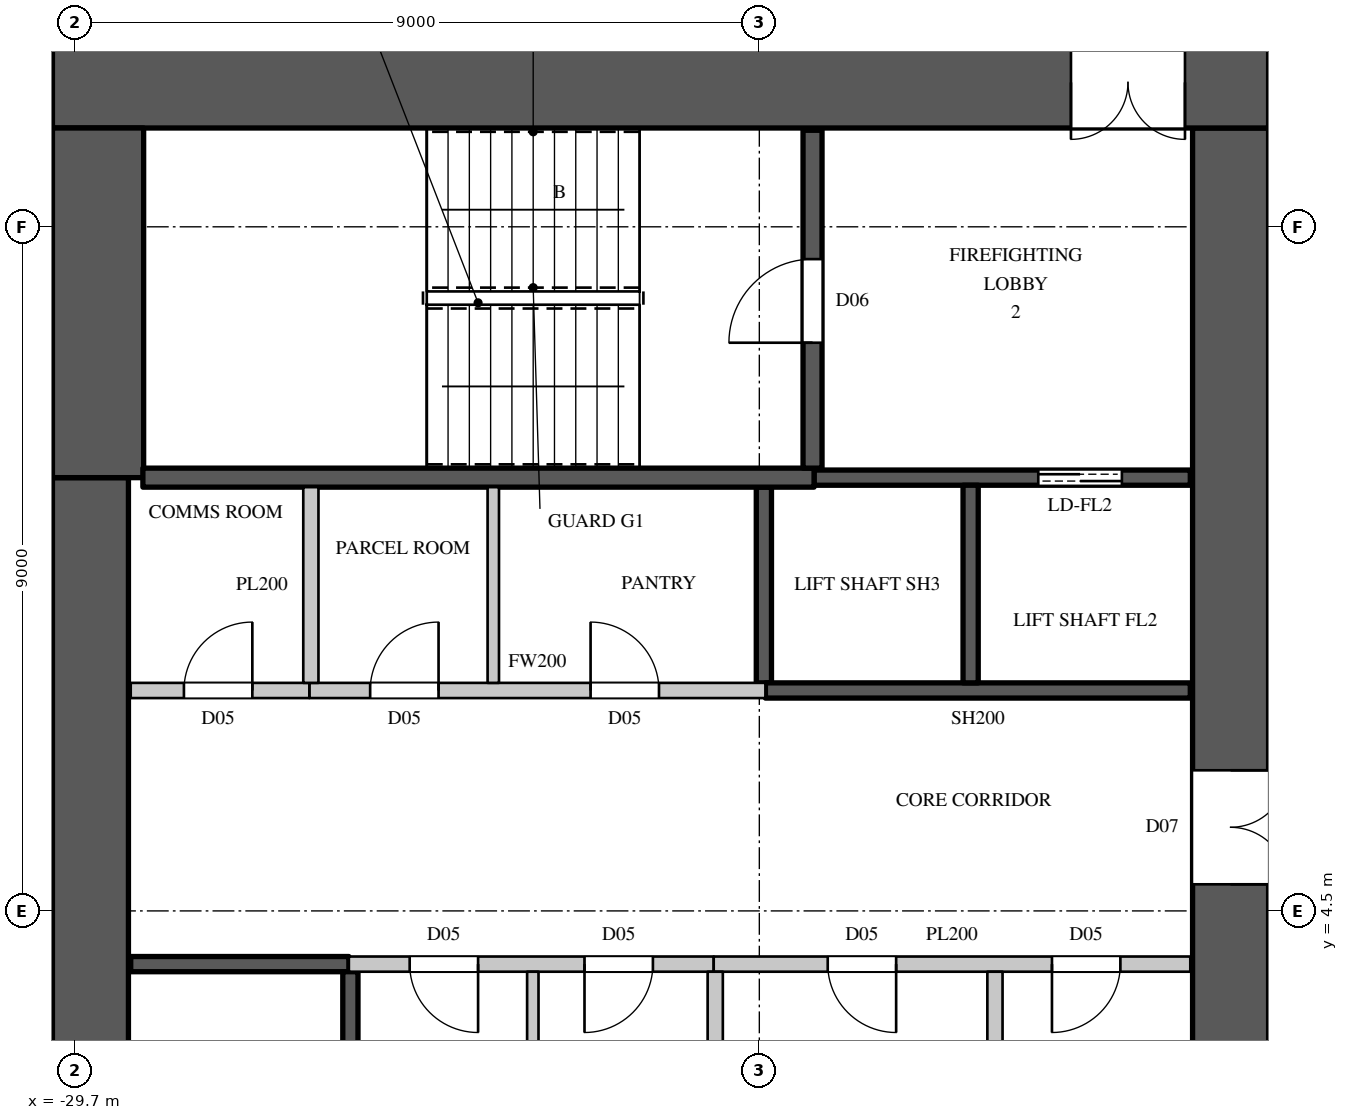
"""IFC4 building model, lengths in metres.
Left out: names, types, materials, properties, quantities, classifications, styles, units other than length and angle.
Written with IfcOpenShell. Run it as: python <this file> out.ifc"""

import sys

from ifc_helpers import new_model, si_unit, direction, frame, frame_2d, origin, place, context, subcontext, project, spatial, rectangle, extrude, element, fill, save


model = new_model("IFC4")
c1 = context("Model", 3, precision=1e-05, world=origin(), true_north=direction((0.0, 1.0)))
c2 = subcontext(c1, "Body", "Model", "MODEL_VIEW")
j1 = project(units=[si_unit("LENGTHUNIT", "METRE"), si_unit("PLANEANGLEUNIT", "RADIAN")], contexts=[c1])
p1 = place(None, origin())
s1 = spatial("IfcSite", under=j1, at=p1, CompositionType="ELEMENT")
p2 = place(p1, origin())
s2 = spatial("IfcBuilding", under=s1, at=p2, CompositionType="ELEMENT")
p3 = place(p2, frame((0.0, 0.0, 123.9)))
s3 = spatial("IfcBuildingStorey", under=s2, at=p3, CompositionType="ELEMENT", Elevation=123.9)
p4 = place(p3, frame((-30.0, 15.4, 0.0), z_axis=(0.0, 0.0, 1.0), x_axis=(1.0, 0.0, 0.0)))
e1 = element("IfcWall", 1, at=p4, inside=s3, PredefinedType="SHEAR", context=c2, shape_type="SweptSolid", body=[
    extrude(rectangle(XDim=16.0, YDim=1.2, at=frame_2d((8.0, 0.0))), origin(), (0.0, 0.0, 1.0), 3.6),
])
p5 = place(p4, frame((13.4, 0.0, 0.0)))
e2 = element("IfcOpeningElement", 2, at=p5, cuts=e1, PredefinedType="OPENING", context=c2, shape_type="SweptSolid", body=[
    extrude(rectangle(XDim=1.5, YDim=2.4, at=frame_2d((0.75, 1.2))), frame((0.0, 0.61, 0.0), z_axis=(0.0, -1.0, 0.0), x_axis=(1.0, 0.0, 0.0)), (0.0, 0.0, 1.0), 1.22),
])
p6 = place(p3, frame((-14.5, -14.8, 0.0), z_axis=(0.0, 0.0, 1.0), x_axis=(0.0, 1.0, 0.0)))
e3 = element("IfcWall", 3, at=p6, inside=s3, PredefinedType="SHEAR", context=c2, shape_type="SweptSolid", body=[
    extrude(rectangle(XDim=29.6, YDim=1.0, at=frame_2d((14.8, 0.0))), origin(), (0.0, 0.0, 1.0), 3.6),
])
p7 = place(p6, frame((8.45, 0.0, 0.0)))
e4 = element("IfcOpeningElement", 4, at=p7, cuts=e3, PredefinedType="OPENING", context=c2, shape_type="SweptSolid", body=[
    extrude(rectangle(XDim=1.5, YDim=2.4, at=frame_2d((0.75, 1.2))), frame((0.0, 0.51, 0.0), z_axis=(0.0, -1.0, 0.0), x_axis=(1.0, 0.0, 0.0)), (0.0, 0.0, 1.0), 1.02),
])
p8 = place(p6, frame((19.65, 0.0, 0.0)))
e5 = element("IfcOpeningElement", 5, at=p8, cuts=e3, PredefinedType="OPENING", context=c2, shape_type="SweptSolid", body=[
    extrude(rectangle(XDim=1.5, YDim=2.4, at=frame_2d((0.75, 1.2))), frame((0.0, 0.51, 0.0), z_axis=(0.0, -1.0, 0.0), x_axis=(1.0, 0.0, 0.0)), (0.0, 0.0, 1.0), 1.02),
])
p9 = place(p6, frame((14.5, 0.0, 0.0)))
e6 = element("IfcOpeningElement", 6, at=p9, cuts=e3, PredefinedType="OPENING", context=c2, shape_type="SweptSolid", body=[
    extrude(rectangle(XDim=0.6, YDim=2.0, at=frame_2d((0.3, 1.0))), frame((0.0, 0.51, 0.0), z_axis=(0.0, -1.0, 0.0), x_axis=(1.0, 0.0, 0.0)), (0.0, 0.0, 1.0), 1.02),
])
p10 = place(p3, frame((-29.5, -10.2, 0.0), z_axis=(0.0, 0.0, 1.0), x_axis=(0.0, 1.0, 0.0)))
e7 = element("IfcWall", 7, at=p10, inside=s3, PredefinedType="SHEAR", context=c2, shape_type="SweptSolid", body=[
    extrude(rectangle(XDim=20.4, YDim=1.0, at=frame_2d((10.2, 0.0))), origin(), (0.0, 0.0, 1.0), 3.6),
])
p11 = place(p3, frame((-29.4, 10.2, 0.0), z_axis=(0.0, 0.0, 1.0), x_axis=(0.0, 1.0, 0.0)))
e8 = element("IfcWall", 8, at=p11, inside=s3, PredefinedType="SHEAR", context=c2, shape_type="SweptSolid", body=[
    extrude(rectangle(XDim=4.6, YDim=1.2, at=frame_2d((2.3, 0.0))), origin(), (0.0, 0.0, 1.0), 3.6),
])
p12 = place(p3, frame((-26.62, 7.4, 0.0), z_axis=(0.0, 0.0, 1.0), x_axis=(1.0, 0.0, 0.0)))
e9 = element("IfcWall", 9, at=p12, inside=s3, PredefinedType="PARTITIONING", context=c2, shape_type="SweptSolid", body=[
    extrude(rectangle(XDim=6.0, YDim=0.2, at=frame_2d((3.0, 0.0))), origin(), (0.0, 0.0, 1.0), 3.3),
])
p13 = place(p12, frame((0.8, 0.0, 0.0)))
e10 = element("IfcOpeningElement", 10, at=p13, cuts=e9, PredefinedType="OPENING", context=c2, shape_type="SweptSolid", body=[
    extrude(rectangle(XDim=0.9, YDim=2.2, at=frame_2d((0.45, 1.1))), frame((0.0, 0.11, 0.0), z_axis=(0.0, -1.0, 0.0), x_axis=(1.0, 0.0, 0.0)), (0.0, 0.0, 1.0), 0.22),
])
p14 = place(p12, frame((3.7, 0.0, 0.0)))
e11 = element("IfcOpeningElement", 11, at=p14, cuts=e9, PredefinedType="OPENING", context=c2, shape_type="SweptSolid", body=[
    extrude(rectangle(XDim=0.9, YDim=2.2, at=frame_2d((0.45, 1.1))), frame((0.0, 0.11, 0.0), z_axis=(0.0, -1.0, 0.0), x_axis=(1.0, 0.0, 0.0)), (0.0, 0.0, 1.0), 0.22),
])
p15 = place(p3, frame((-26.1, 3.8, 0.0), z_axis=(0.0, 0.0, 1.0), x_axis=(1.0, 0.0, 0.0)))
e12 = element("IfcWall", 12, at=p15, inside=s3, PredefinedType="PARTITIONING", context=c2, shape_type="SweptSolid", body=[
    extrude(rectangle(XDim=4.8, YDim=0.2, at=frame_2d((2.4, 0.0))), origin(), (0.0, 0.0, 1.0), 3.3),
])
p16 = place(p15, frame((0.8, 0.0, 0.0)))
e13 = element("IfcOpeningElement", 13, at=p16, cuts=e12, PredefinedType="OPENING", context=c2, shape_type="SweptSolid", body=[
    extrude(rectangle(XDim=0.9, YDim=2.2, at=frame_2d((0.45, 1.1))), frame((0.0, 0.11, 0.0), z_axis=(0.0, -1.0, 0.0), x_axis=(1.0, 0.0, 0.0)), (0.0, 0.0, 1.0), 0.22),
])
p17 = place(p15, frame((3.1, 0.0, 0.0)))
e14 = element("IfcOpeningElement", 14, at=p17, cuts=e12, PredefinedType="OPENING", context=c2, shape_type="SweptSolid", body=[
    extrude(rectangle(XDim=0.9, YDim=2.2, at=frame_2d((0.45, 1.1))), frame((0.0, 0.11, 0.0), z_axis=(0.0, -1.0, 0.0), x_axis=(1.0, 0.0, 0.0)), (0.0, 0.0, 1.0), 0.22),
])
p18 = place(p3, frame((-24.2, 7.5, 0.0), z_axis=(0.0, 0.0, 1.0), x_axis=(0.0, 1.0, 0.0)))
e15 = element("IfcWall", 15, at=p18, inside=s3, PredefinedType="PARTITIONING", context=c2, shape_type="SweptSolid", body=[
    extrude(rectangle(XDim=2.575, YDim=0.15, at=frame_2d((1.288, 0.0))), origin(), (0.0, 0.0, 1.0), 3.3),
])
p19 = place(p3, frame((-23.68, 1.1, 0.0), z_axis=(0.0, 0.0, 1.0), x_axis=(0.0, 1.0, 0.0)))
e16 = element("IfcWall", 16, at=p19, inside=s3, PredefinedType="PARTITIONING", context=c2, shape_type="SweptSolid", body=[
    extrude(rectangle(XDim=2.6, YDim=0.15, at=frame_2d((1.3, 0.0))), origin(), (0.0, 0.0, 1.0), 3.3),
])
p20 = place(p3, frame((-28.97, 7.4, 0.0), z_axis=(0.0, 0.0, 1.0), x_axis=(1.0, 0.0, 0.0)))
e17 = element("IfcWall", 17, at=p20, inside=s3, PredefinedType="PARTITIONING", context=c2, shape_type="SweptSolid", body=[
    extrude(rectangle(XDim=2.35, YDim=0.2, at=frame_2d((1.175, 0.0))), origin(), (0.0, 0.0, 1.0), 3.3),
])
p21 = place(p20, frame((0.7, 0.0, 0.0)))
e18 = element("IfcOpeningElement", 18, at=p21, cuts=e17, PredefinedType="OPENING", context=c2, shape_type="SweptSolid", body=[
    extrude(rectangle(XDim=0.9, YDim=2.2, at=frame_2d((0.45, 1.1))), frame((0.0, 0.11, 0.0), z_axis=(0.0, -1.0, 0.0), x_axis=(1.0, 0.0, 0.0)), (0.0, 0.0, 1.0), 0.22),
])
p22 = place(p3, frame((-26.6, 7.5, 0.0), z_axis=(0.0, 0.0, 1.0), x_axis=(0.0, 1.0, 0.0)))
e19 = element("IfcWall", 19, at=p22, inside=s3, PredefinedType="PARTITIONING", context=c2, shape_type="SweptSolid", body=[
    extrude(rectangle(XDim=2.575, YDim=0.2, at=frame_2d((1.288, 0.0))), origin(), (0.0, 0.0, 1.0), 3.3),
])
p23 = place(p3, frame((-21.3, 3.8, 0.0), z_axis=(0.0, 0.0, 1.0), x_axis=(1.0, 0.0, 0.0)))
e20 = element("IfcWall", 20, at=p23, inside=s3, PredefinedType="PARTITIONING", context=c2, shape_type="SweptSolid", body=[
    extrude(rectangle(XDim=6.27, YDim=0.2, at=frame_2d((3.135, 0.0))), origin(), (0.0, 0.0, 1.0), 3.3),
])
p24 = place(p23, frame((1.5, 0.0, 0.0)))
e21 = element("IfcOpeningElement", 21, at=p24, cuts=e20, PredefinedType="OPENING", context=c2, shape_type="SweptSolid", body=[
    extrude(rectangle(XDim=0.9, YDim=2.2, at=frame_2d((0.45, 1.1))), frame((0.0, 0.11, 0.0), z_axis=(0.0, -1.0, 0.0), x_axis=(1.0, 0.0, 0.0)), (0.0, 0.0, 1.0), 0.22),
])
p25 = place(p23, frame((4.45, 0.0, 0.0)))
e22 = element("IfcOpeningElement", 22, at=p25, cuts=e20, PredefinedType="OPENING", context=c2, shape_type="SweptSolid", body=[
    extrude(rectangle(XDim=0.9, YDim=2.2, at=frame_2d((0.45, 1.1))), frame((0.0, 0.11, 0.0), z_axis=(0.0, -1.0, 0.0), x_axis=(1.0, 0.0, 0.0)), (0.0, 0.0, 1.0), 0.22),
])
for number, where, z_axis, x_axis in (
    (23, (-21.28, 1.1, 0.0), (0.0, 0.0, 1.0), (0.0, 1.0, 0.0)),
    (24, (-17.6, 1.1, 0.0), (0.0, 0.0, 1.0), (0.0, 1.0, 0.0)),
):
    element("IfcWall", number, at=place(p3, frame(where, z_axis=z_axis, x_axis=x_axis)), inside=s3, PredefinedType="PARTITIONING", context=c2, shape_type="SweptSolid", body=[
        extrude(rectangle(XDim=2.6, YDim=0.2, at=frame_2d((1.3, 0.0))), origin(), (0.0, 0.0, 1.0), 3.3),
    ])
p26 = place(p3, frame((-28.97, 3.8, 0.0), z_axis=(0.0, 0.0, 1.0), x_axis=(1.0, 0.0, 0.0)))
e25 = element("IfcWall", 25, at=p26, inside=s3, PredefinedType="SHEAR", context=c2, shape_type="SweptSolid", body=[
    extrude(rectangle(XDim=2.87, YDim=0.2, at=frame_2d((1.435, 0.0))), origin(), (0.0, 0.0, 1.0), 3.3),
])
p27 = place(p3, frame((-26.08, 1.1, 0.0), z_axis=(0.0, 0.0, 1.0), x_axis=(0.0, 1.0, 0.0)))
e26 = element("IfcWall", 26, at=p27, inside=s3, PredefinedType="SHEAR", context=c2, shape_type="SweptSolid", body=[
    extrude(rectangle(XDim=2.6, YDim=0.2, at=frame_2d((1.3, 0.0))), origin(), (0.0, 0.0, 1.0), 3.3),
])
p28 = place(p3, frame((-20.64, 7.5, 0.0), z_axis=(0.0, 0.0, 1.0), x_axis=(0.0, 1.0, 0.0)))
e27 = element("IfcWall", 27, at=p28, inside=s3, PredefinedType="SHEAR", context=c2, shape_type="SweptSolid", body=[
    extrude(rectangle(XDim=2.575, YDim=0.2, at=frame_2d((1.288, 0.0))), origin(), (0.0, 0.0, 1.0), 3.3),
])
p29 = place(p3, frame((-20.62, 7.4, 0.0), z_axis=(0.0, 0.0, 1.0), x_axis=(1.0, 0.0, 0.0)))
e28 = element("IfcWall", 28, at=p29, inside=s3, PredefinedType="SHEAR", context=c2, shape_type="SweptSolid", body=[
    extrude(rectangle(XDim=5.59, YDim=0.2, at=frame_2d((2.795, 0.0))), origin(), (0.0, 0.0, 1.0), 3.3),
])
p30 = place(p3, frame((-19.98, 10.2, 0.0), z_axis=(0.0, 0.0, 1.0), x_axis=(1.0, 0.0, 0.0)))
e29 = element("IfcWall", 29, at=p30, inside=s3, PredefinedType="SHEAR", context=c2, shape_type="SweptSolid", body=[
    extrude(rectangle(XDim=4.95, YDim=0.2, at=frame_2d((2.475, 0.0))), origin(), (0.0, 0.0, 1.0), 3.3),
])
p31 = place(p30, frame((2.95, 0.0, 0.0)))
e30 = element("IfcOpeningElement", 30, at=p31, cuts=e29, PredefinedType="OPENING", context=c2, shape_type="SweptSolid", body=[
    extrude(rectangle(XDim=1.1, YDim=2.2, at=frame_2d((0.55, 1.1))), frame((0.0, 0.11, 0.0), z_axis=(0.0, -1.0, 0.0), x_axis=(1.0, 0.0, 0.0)), (0.0, 0.0, 1.0), 0.22),
])
p32 = place(p3, frame((-17.92, 7.5, 0.0), z_axis=(0.0, 0.0, 1.0), x_axis=(0.0, 1.0, 0.0)))
e31 = element("IfcWall", 31, at=p32, inside=s3, PredefinedType="SHEAR", context=c2, shape_type="SweptSolid", body=[
    extrude(rectangle(XDim=2.6, YDim=0.2, at=frame_2d((1.3, 0.0))), origin(), (0.0, 0.0, 1.0), 3.6),
])
p33 = place(p3, frame((-28.81, 10.2, 0.0), z_axis=(0.0, 0.0, 1.0), x_axis=(1.0, 0.0, 0.0)))
e32 = element("IfcWall", 32, at=p33, inside=s3, PredefinedType="SHEAR", context=c2, shape_type="SweptSolid", body=[
    extrude(rectangle(XDim=8.83, YDim=0.25, at=frame_2d((4.415, 0.0))), origin(), (0.0, 0.0, 1.0), 3.3),
])
p34 = place(p3, frame((-20.0, 10.325, 0.0), z_axis=(0.0, 0.0, 1.0), x_axis=(0.0, 1.0, 0.0)))
e33 = element("IfcWall", 33, at=p34, inside=s3, PredefinedType="SHEAR", context=c2, shape_type="SweptSolid", body=[
    extrude(rectangle(XDim=4.445, YDim=0.25, at=frame_2d((2.223, 0.0))), origin(), (0.0, 0.0, 1.0), 3.3),
])
p35 = place(p34, frame((1.65, 0.0, 0.0)))
e34 = element("IfcOpeningElement", 34, at=p35, cuts=e33, PredefinedType="OPENING", context=c2, shape_type="SweptSolid", body=[
    extrude(rectangle(XDim=1.1, YDim=2.2, at=frame_2d((0.55, 1.1))), frame((0.0, 0.135, 0.0), z_axis=(0.0, -1.0, 0.0), x_axis=(1.0, 0.0, 0.0)), (0.0, 0.0, 1.0), 0.27),
])
p36 = place(p35, origin())
e35 = element("IfcDoor", 35, at=p36, inside=s3, OperationType="SINGLE_SWING_LEFT", PredefinedType="DOOR", context=c2, shape_type="SweptSolid", body=[
    extrude(rectangle(XDim=1.1, YDim=2.2, at=frame_2d((0.55, 1.1))), frame((0.0, 0.025, 0.0), z_axis=(0.0, -1.0, 0.0), x_axis=(1.0, 0.0, 0.0)), (0.0, 0.0, 1.0), 0.05),
])
fill(e34, e35)
p37 = place(p16, origin())
e36 = element("IfcDoor", 36, at=p37, inside=s3, OperationType="SINGLE_SWING_LEFT", PredefinedType="DOOR", context=c2, shape_type="SweptSolid", body=[
    extrude(rectangle(XDim=0.9, YDim=2.2, at=frame_2d((0.45, 1.1))), frame((0.0, 0.025, 0.0), z_axis=(0.0, -1.0, 0.0), x_axis=(1.0, 0.0, 0.0)), (0.0, 0.0, 1.0), 0.05),
])
fill(e13, e36)
p38 = place(p17, origin())
e37 = element("IfcDoor", 37, at=p38, inside=s3, OperationType="SINGLE_SWING_RIGHT", PredefinedType="DOOR", context=c2, shape_type="SweptSolid", body=[
    extrude(rectangle(XDim=0.9, YDim=2.2, at=frame_2d((0.45, 1.1))), frame((0.0, 0.025, 0.0), z_axis=(0.0, -1.0, 0.0), x_axis=(1.0, 0.0, 0.0)), (0.0, 0.0, 1.0), 0.05),
])
fill(e14, e37)
p39 = place(p24, origin())
e38 = element("IfcDoor", 38, at=p39, inside=s3, OperationType="SINGLE_SWING_LEFT", PredefinedType="DOOR", context=c2, shape_type="SweptSolid", body=[
    extrude(rectangle(XDim=0.9, YDim=2.2, at=frame_2d((0.45, 1.1))), frame((0.0, 0.025, 0.0), z_axis=(0.0, -1.0, 0.0), x_axis=(1.0, 0.0, 0.0)), (0.0, 0.0, 1.0), 0.05),
])
fill(e21, e38)
p40 = place(p25, origin())
e39 = element("IfcDoor", 39, at=p40, inside=s3, OperationType="SINGLE_SWING_RIGHT", PredefinedType="DOOR", context=c2, shape_type="SweptSolid", body=[
    extrude(rectangle(XDim=0.9, YDim=2.2, at=frame_2d((0.45, 1.1))), frame((0.0, 0.025, 0.0), z_axis=(0.0, -1.0, 0.0), x_axis=(1.0, 0.0, 0.0)), (0.0, 0.0, 1.0), 0.05),
])
fill(e22, e39)
p41 = place(p21, origin())
e40 = element("IfcDoor", 40, at=p41, inside=s3, OperationType="SINGLE_SWING_RIGHT", PredefinedType="DOOR", context=c2, shape_type="SweptSolid", body=[
    extrude(rectangle(XDim=0.9, YDim=2.2, at=frame_2d((0.45, 1.1))), frame((0.0, 0.025, 0.0), z_axis=(0.0, -1.0, 0.0), x_axis=(1.0, 0.0, 0.0)), (0.0, 0.0, 1.0), 0.05),
])
fill(e18, e40)
p42 = place(p13, origin())
e41 = element("IfcDoor", 41, at=p42, inside=s3, OperationType="SINGLE_SWING_RIGHT", PredefinedType="DOOR", context=c2, shape_type="SweptSolid", body=[
    extrude(rectangle(XDim=0.9, YDim=2.2, at=frame_2d((0.45, 1.1))), frame((0.0, 0.025, 0.0), z_axis=(0.0, -1.0, 0.0), x_axis=(1.0, 0.0, 0.0)), (0.0, 0.0, 1.0), 0.05),
])
fill(e10, e41)
p43 = place(p14, origin())
e42 = element("IfcDoor", 42, at=p43, inside=s3, OperationType="SINGLE_SWING_LEFT", PredefinedType="DOOR", context=c2, shape_type="SweptSolid", body=[
    extrude(rectangle(XDim=0.9, YDim=2.2, at=frame_2d((0.45, 1.1))), frame((0.0, 0.025, 0.0), z_axis=(0.0, -1.0, 0.0), x_axis=(1.0, 0.0, 0.0)), (0.0, 0.0, 1.0), 0.05),
])
fill(e11, e42)
p44 = place(p31, origin())
e43 = element("IfcDoor", 43, at=p44, inside=s3, OperationType="DOUBLE_DOOR_SLIDING", PredefinedType="DOOR", context=c2, shape_type="SweptSolid", body=[
    extrude(rectangle(XDim=1.1, YDim=2.2, at=frame_2d((0.55, 1.1))), frame((0.0, 0.025, 0.0), z_axis=(0.0, -1.0, 0.0), x_axis=(1.0, 0.0, 0.0)), (0.0, 0.0, 1.0), 0.05),
])
fill(e30, e43)
p45 = place(p5, origin())
e44 = element("IfcDoor", 44, at=p45, inside=s3, OperationType="DOUBLE_DOOR_SINGLE_SWING", PredefinedType="DOOR", context=c2, shape_type="SweptSolid", body=[
    extrude(rectangle(XDim=1.5, YDim=2.4, at=frame_2d((0.75, 1.2))), frame((0.0, 0.025, 0.0), z_axis=(0.0, -1.0, 0.0), x_axis=(1.0, 0.0, 0.0)), (0.0, 0.0, 1.0), 0.05),
])
fill(e2, e44)
p46 = place(p8, origin())
e45 = element("IfcDoor", 45, at=p46, inside=s3, OperationType="DOUBLE_DOOR_SINGLE_SWING", PredefinedType="DOOR", context=c2, shape_type="SweptSolid", body=[
    extrude(rectangle(XDim=1.5, YDim=2.4, at=frame_2d((0.75, 1.2))), frame((0.0, -0.445, 0.0), z_axis=(0.0, -1.0, 0.0), x_axis=(1.0, 0.0, 0.0)), (0.0, 0.0, 1.0), 0.05),
])
fill(e5, e45)
save(model, sys.argv[1])
